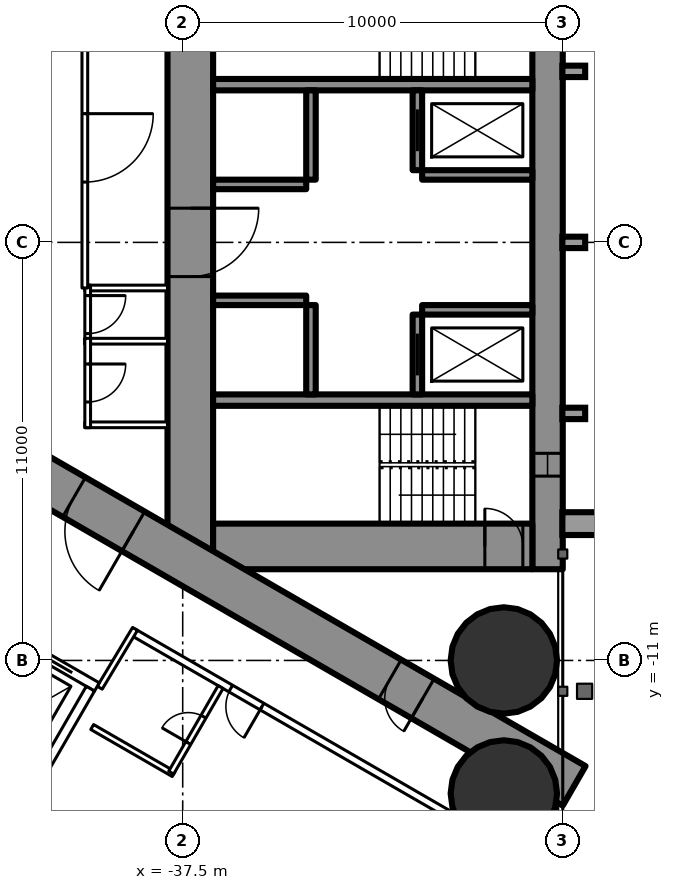
"""IFC4 building model, lengths in metres.
Left out: names, types, materials, properties, quantities, classifications, styles, units other than length and angle.
Written with IfcOpenShell. Run it as: python <this file> out.ifc"""

import sys

from ifc_helpers import new_model, si_unit, direction, frame, frame_2d, origin, origin_2d, place, context, subcontext, project, spatial, rectangle, circle, extrude, element, fill, save


model = new_model("IFC4")
c1 = context("Model", 3, precision=1e-05, world=origin(), true_north=direction((0.0, 1.0)))
c2 = subcontext(c1, "Body", "Model", "MODEL_VIEW")
j1 = project(units=[si_unit("LENGTHUNIT", "METRE"), si_unit("PLANEANGLEUNIT", "RADIAN")], contexts=[c1])
p1 = place(None, origin())
s1 = spatial("IfcSite", under=j1, at=p1, CompositionType="ELEMENT")
p2 = place(p1, origin())
s2 = spatial("IfcBuilding", under=s1, at=p2, CompositionType="ELEMENT")
p3 = place(p2, frame((0.0, 0.0, 170.3)))
s3 = spatial("IfcBuildingStorey", under=s2, at=p3, CompositionType="ELEMENT", Elevation=170.3)
for number, where, z_axis, x_axis in (
    (1, (-29.05, -11.0, 0.0), (0.0, 0.0, 1.0), (1.0, 0.0, 0.0)),
    (2, (-29.05, -14.5, 0.0), (0.0, 0.0, 1.0), (1.0, 0.0, 0.0)),
):
    element("IfcColumn", number, at=place(p3, frame(where, z_axis=z_axis, x_axis=x_axis)), inside=s3, PredefinedType="COLUMN", context=c2, shape_type="SweptSolid", body=[
        extrude(circle(Radius=1.4, at=origin_2d()), origin(), (0.0, 0.0, 1.0), 3.5),
    ])
p4 = place(p3, frame((-27.9, 8.6, 0.0), z_axis=(0.0, 0.0, 1.0), x_axis=(0.0, -1.0, 0.0)))
e3 = element("IfcWall", 3, at=p4, inside=s3, PredefinedType="SHEAR", context=c2, shape_type="SweptSolid", body=[
    extrude(rectangle(XDim=17.2, YDim=0.8, at=frame_2d((8.6, 0.0))), origin(), (0.0, 0.0, 1.0), 3.5),
])
p5 = place(p4, frame((2.45, 0.0, 0.6)))
e4 = element("IfcOpeningElement", 4, at=p5, cuts=e3, PredefinedType="OPENING", context=c2, shape_type="SweptSolid", body=[
    extrude(rectangle(XDim=0.6, YDim=2.1, at=frame_2d((0.3, 1.05))), frame((0.0, 0.41, 0.0), z_axis=(0.0, -1.0, 0.0), x_axis=(1.0, 0.0, 0.0)), (0.0, 0.0, 1.0), 0.82),
])
p6 = place(p4, frame((14.15, 0.0, 0.6)))
e5 = element("IfcOpeningElement", 5, at=p6, cuts=e3, PredefinedType="OPENING", context=c2, shape_type="SweptSolid", body=[
    extrude(rectangle(XDim=0.6, YDim=2.1, at=frame_2d((0.3, 1.05))), frame((0.0, 0.41, 0.0), z_axis=(0.0, -1.0, 0.0), x_axis=(1.0, 0.0, 0.0)), (0.0, 0.0, 1.0), 0.82),
])
p7 = place(p3, frame((-37.3, 8.6, 0.0), z_axis=(0.0, 0.0, 1.0), x_axis=(0.0, -1.0, 0.0)))
e6 = element("IfcWall", 6, at=p7, inside=s3, PredefinedType="SHEAR", context=c2, shape_type="SweptSolid", body=[
    extrude(rectangle(XDim=17.2, YDim=1.2, at=frame_2d((8.6, 0.0))), origin(), (0.0, 0.0, 1.0), 3.5),
])
p8 = place(p7, frame((7.7, 0.0, 0.0)))
e7 = element("IfcOpeningElement", 7, at=p8, cuts=e6, PredefinedType="OPENING", context=c2, shape_type="SweptSolid", body=[
    extrude(rectangle(XDim=1.8, YDim=2.2, at=frame_2d((0.9, 1.1))), frame((0.0, 0.61, 0.0), z_axis=(0.0, -1.0, 0.0), x_axis=(1.0, 0.0, 0.0)), (0.0, 0.0, 1.0), 1.22),
])
p9 = place(p3, frame((-28.3, -8.0, 0.0), z_axis=(0.0, 0.0, 1.0), x_axis=(-1.0, 0.0, 0.0)))
e8 = element("IfcWall", 8, at=p9, inside=s3, PredefinedType="SHEAR", context=c2, shape_type="SweptSolid", body=[
    extrude(rectangle(XDim=8.4, YDim=1.2, at=frame_2d((4.2, 0.0))), origin(), (0.0, 0.0, 1.0), 3.5),
])
p10 = place(p9, frame((0.25, 0.0, 0.0)))
e9 = element("IfcOpeningElement", 9, at=p10, cuts=e8, PredefinedType="OPENING", context=c2, shape_type="SweptSolid", body=[
    extrude(rectangle(XDim=1.0, YDim=2.2, at=frame_2d((0.5, 1.1))), frame((0.0, 0.61, 0.0), z_axis=(0.0, -1.0, 0.0), x_axis=(1.0, 0.0, 0.0)), (0.0, 0.0, 1.0), 1.22),
])
for number, where, z_axis, x_axis in (
    (10, (-28.3, 4.15, 0.0), (0.0, 0.0, 1.0), (-1.0, 0.0, 0.0)),
    (11, (-28.3, -4.15, 0.0), (0.0, 0.0, 1.0), (-1.0, 0.0, 0.0)),
):
    element("IfcWall", number, at=place(p3, frame(where, z_axis=z_axis, x_axis=x_axis)), inside=s3, PredefinedType="SHEAR", context=c2, shape_type="SweptSolid", body=[
        extrude(rectangle(XDim=8.4, YDim=0.3, at=frame_2d((4.2, 0.0))), origin(), (0.0, 0.0, 1.0), 3.5),
    ])
p11 = place(p3, frame((-31.325, 4.0, 0.0), z_axis=(0.0, 0.0, 1.0), x_axis=(0.0, -1.0, 0.0)))
e12 = element("IfcWall", 12, at=p11, inside=s3, PredefinedType="SHEAR", context=c2, shape_type="SweptSolid", body=[
    extrude(rectangle(XDim=2.1, YDim=0.25, at=frame_2d((1.05, 0.0))), origin(), (0.0, 0.0, 1.0), 3.5),
])
p12 = place(p11, frame((0.5, 0.0, 0.0)))
e13 = element("IfcOpeningElement", 13, at=p12, cuts=e12, PredefinedType="OPENING", context=c2, shape_type="SweptSolid", body=[
    extrude(rectangle(XDim=1.1, YDim=2.2, at=frame_2d((0.55, 1.1))), frame((0.0, 0.135, 0.0), z_axis=(0.0, -1.0, 0.0), x_axis=(1.0, 0.0, 0.0)), (0.0, 0.0, 1.0), 0.27),
])
p13 = place(p3, frame((-34.125, 4.0, 0.0), z_axis=(0.0, 0.0, 1.0), x_axis=(0.0, -1.0, 0.0)))
e14 = element("IfcWall", 14, at=p13, inside=s3, PredefinedType="SHEAR", context=c2, shape_type="SweptSolid", body=[
    extrude(rectangle(XDim=2.35, YDim=0.25, at=frame_2d((1.175, 0.0))), origin(), (0.0, 0.0, 1.0), 3.5),
])
p14 = place(p3, frame((-28.3, 1.775, 0.0), z_axis=(0.0, 0.0, 1.0), x_axis=(-1.0, 0.0, 0.0)))
e15 = element("IfcWall", 15, at=p14, inside=s3, PredefinedType="SHEAR", context=c2, shape_type="SweptSolid", body=[
    extrude(rectangle(XDim=2.9, YDim=0.25, at=frame_2d((1.45, 0.0))), origin(), (0.0, 0.0, 1.0), 3.5),
])
p15 = place(p3, frame((-34.25, 1.525, 0.0), z_axis=(0.0, 0.0, 1.0), x_axis=(-1.0, 0.0, 0.0)))
e16 = element("IfcWall", 16, at=p15, inside=s3, PredefinedType="SHEAR", context=c2, shape_type="SweptSolid", body=[
    extrude(rectangle(XDim=2.45, YDim=0.25, at=frame_2d((1.225, 0.0))), origin(), (0.0, 0.0, 1.0), 3.5),
])
p16 = place(p3, frame((-31.325, -1.9, 0.0), z_axis=(0.0, 0.0, 1.0), x_axis=(0.0, -1.0, 0.0)))
e17 = element("IfcWall", 17, at=p16, inside=s3, PredefinedType="SHEAR", context=c2, shape_type="SweptSolid", body=[
    extrude(rectangle(XDim=2.1, YDim=0.25, at=frame_2d((1.05, 0.0))), origin(), (0.0, 0.0, 1.0), 3.5),
])
p17 = place(p16, frame((0.5, 0.0, 0.0)))
e18 = element("IfcOpeningElement", 18, at=p17, cuts=e17, PredefinedType="OPENING", context=c2, shape_type="SweptSolid", body=[
    extrude(rectangle(XDim=1.1, YDim=2.2, at=frame_2d((0.55, 1.1))), frame((0.0, 0.135, 0.0), z_axis=(0.0, -1.0, 0.0), x_axis=(1.0, 0.0, 0.0)), (0.0, 0.0, 1.0), 0.27),
])
p18 = place(p3, frame((-34.125, -1.65, 0.0), z_axis=(0.0, 0.0, 1.0), x_axis=(0.0, -1.0, 0.0)))
e19 = element("IfcWall", 19, at=p18, inside=s3, PredefinedType="SHEAR", context=c2, shape_type="SweptSolid", body=[
    extrude(rectangle(XDim=2.35, YDim=0.25, at=frame_2d((1.175, 0.0))), origin(), (0.0, 0.0, 1.0), 3.5),
])
p19 = place(p3, frame((-28.3, -1.775, 0.0), z_axis=(0.0, 0.0, 1.0), x_axis=(-1.0, 0.0, 0.0)))
e20 = element("IfcWall", 20, at=p19, inside=s3, PredefinedType="SHEAR", context=c2, shape_type="SweptSolid", body=[
    extrude(rectangle(XDim=2.9, YDim=0.25, at=frame_2d((1.45, 0.0))), origin(), (0.0, 0.0, 1.0), 3.5),
])
p20 = place(p3, frame((-34.25, -1.525, 0.0), z_axis=(0.0, 0.0, 1.0), x_axis=(-1.0, 0.0, 0.0)))
e21 = element("IfcWall", 21, at=p20, inside=s3, PredefinedType="SHEAR", context=c2, shape_type="SweptSolid", body=[
    extrude(rectangle(XDim=2.45, YDim=0.25, at=frame_2d((1.225, 0.0))), origin(), (0.0, 0.0, 1.0), 3.5),
])
p21 = place(p3, frame((-27.2, 14.3, 0.0), z_axis=(0.0, 0.0, 1.0), x_axis=(-0.866026593062, -0.499997940104, 0.0)))
e22 = element("IfcWall", 22, at=p21, inside=s3, PredefinedType="SHEAR", context=c2, shape_type="SweptSolid", body=[
    extrude(rectangle(XDim=28.946, YDim=1.2, at=frame_2d((14.473, 0.0))), origin(), (0.0, 0.0, 1.0), 3.5),
])
p22 = place(p21, frame((4.6, 0.0, 0.0)))
e23 = element("IfcOpeningElement", 23, at=p22, cuts=e22, PredefinedType="OPENING", context=c2, shape_type="SweptSolid", body=[
    extrude(rectangle(XDim=1.0, YDim=2.2, at=frame_2d((0.5, 1.1))), frame((0.0, 0.61, 0.0), z_axis=(0.0, -1.0, 0.0), x_axis=(1.0, 0.0, 0.0)), (0.0, 0.0, 1.0), 1.22),
])
p23 = place(p21, frame((13.395, 0.0, 0.0)))
e24 = element("IfcOpeningElement", 24, at=p23, cuts=e22, PredefinedType="OPENING", context=c2, shape_type="SweptSolid", body=[
    extrude(rectangle(XDim=1.8, YDim=2.2, at=frame_2d((0.9, 1.1))), frame((0.0, 0.61, 0.0), z_axis=(0.0, -1.0, 0.0), x_axis=(1.0, 0.0, 0.0)), (0.0, 0.0, 1.0), 1.22),
])
p24 = place(p3, frame((-27.2, -14.3, 0.0), z_axis=(0.0, 0.0, 1.0), x_axis=(-0.866024021859, 0.500002393557, 0.0)))
e25 = element("IfcWall", 25, at=p24, inside=s3, PredefinedType="SHEAR", context=c2, shape_type="SweptSolid", body=[
    extrude(rectangle(XDim=27.907, YDim=1.2, at=frame_2d((13.954, 0.0))), origin(), (0.0, 0.0, 1.0), 3.5),
])
p25 = place(p24, frame((4.6, 0.0, 0.0)))
e26 = element("IfcOpeningElement", 26, at=p25, cuts=e25, PredefinedType="OPENING", context=c2, shape_type="SweptSolid", body=[
    extrude(rectangle(XDim=1.0, YDim=2.2, at=frame_2d((0.5, 1.1))), frame((0.0, 0.61, 0.0), z_axis=(0.0, -1.0, 0.0), x_axis=(1.0, 0.0, 0.0)), (0.0, 0.0, 1.0), 1.22),
])
p26 = place(p24, frame((13.395, 0.0, 0.0)))
e27 = element("IfcOpeningElement", 27, at=p26, cuts=e25, PredefinedType="OPENING", context=c2, shape_type="SweptSolid", body=[
    extrude(rectangle(XDim=1.8, YDim=2.2, at=frame_2d((0.9, 1.1))), frame((0.0, 0.61, 0.0), z_axis=(0.0, -1.0, 0.0), x_axis=(1.0, 0.0, 0.0)), (0.0, 0.0, 1.0), 1.22),
])
p27 = place(p3, frame((-27.86, 16.575, 0.0), z_axis=(0.0, 0.0, 1.0), x_axis=(-0.866025533911, -0.499999774615, 0.0)))
e28 = element("IfcWall", 28, at=p27, inside=s3, PredefinedType="PARTITIONING", context=c2, shape_type="SweptSolid", body=[
    extrude(rectangle(XDim=33.149, YDim=0.2, at=frame_2d((16.575, 0.0))), origin(), (0.0, 0.0, 1.0), 3.25),
])
p28 = place(p27, frame((3.75, 0.0, 0.0)))
e29 = element("IfcOpeningElement", 29, at=p28, cuts=e28, PredefinedType="OPENING", context=c2, shape_type="SweptSolid", body=[
    extrude(rectangle(XDim=1.0, YDim=2.2, at=frame_2d((0.5, 1.1))), frame((0.0, 0.11, 0.0), z_axis=(0.0, -1.0, 0.0), x_axis=(1.0, 0.0, 0.0)), (0.0, 0.0, 1.0), 0.22),
])
p29 = place(p27, frame((20.347, 0.0, 0.0)))
e30 = element("IfcOpeningElement", 30, at=p29, cuts=e28, PredefinedType="OPENING", context=c2, shape_type="SweptSolid", body=[
    extrude(rectangle(XDim=0.95, YDim=2.2, at=frame_2d((0.475, 1.1))), frame((0.0, 0.11, 0.0), z_axis=(0.0, -1.0, 0.0), x_axis=(1.0, 0.0, 0.0)), (0.0, 0.0, 1.0), 0.22),
])
p30 = place(p27, frame((24.397, 0.0, 0.0)))
e31 = element("IfcOpeningElement", 31, at=p30, cuts=e28, PredefinedType="OPENING", context=c2, shape_type="SweptSolid", body=[
    extrude(rectangle(XDim=0.95, YDim=2.2, at=frame_2d((0.475, 1.1))), frame((0.0, 0.11, 0.0), z_axis=(0.0, -1.0, 0.0), x_axis=(1.0, 0.0, 0.0)), (0.0, 0.0, 1.0), 0.22),
])
p31 = place(p27, frame((30.042, 0.0, 0.0)))
e32 = element("IfcOpeningElement", 32, at=p31, cuts=e28, PredefinedType="OPENING", context=c2, shape_type="SweptSolid", body=[
    extrude(rectangle(XDim=0.95, YDim=2.2, at=frame_2d((0.475, 1.1))), frame((0.0, 0.11, 0.0), z_axis=(0.0, -1.0, 0.0), x_axis=(1.0, 0.0, 0.0)), (0.0, 0.0, 1.0), 0.22),
])
p32 = place(p3, frame((-27.86, -16.575, 0.0), z_axis=(0.0, 0.0, 1.0), x_axis=(-0.866027756871, 0.499995924312, 0.0)))
e33 = element("IfcWall", 33, at=p32, inside=s3, PredefinedType="PARTITIONING", context=c2, shape_type="SweptSolid", body=[
    extrude(rectangle(XDim=12.622, YDim=0.2, at=frame_2d((6.311, 0.0))), origin(), (0.0, 0.0, 1.0), 3.25),
])
p33 = place(p32, frame((8.722, 0.0, 0.0)))
e34 = element("IfcOpeningElement", 34, at=p33, cuts=e33, PredefinedType="OPENING", context=c2, shape_type="SweptSolid", body=[
    extrude(rectangle(XDim=0.95, YDim=2.2, at=frame_2d((0.475, 1.1))), frame((0.0, 0.11, 0.0), z_axis=(0.0, -1.0, 0.0), x_axis=(1.0, 0.0, 0.0)), (0.0, 0.0, 1.0), 0.22),
])
p34 = place(p3, frame((-39.683, -11.718, 0.0), z_axis=(0.0, 0.0, 1.0), x_axis=(0.514336634837, 0.857588377991, 0.0)))
e35 = element("IfcWall", 35, at=p34, inside=s3, PredefinedType="PARTITIONING", context=c2, shape_type="SweptSolid", body=[
    extrude(rectangle(XDim=1.805, YDim=0.15, at=frame_2d((0.903, 0.0))), origin(), (0.0, 0.0, 1.0), 3.25),
])
p35 = place(p3, frame((-37.738, -13.989, 0.0), z_axis=(0.0, 0.0, 1.0), x_axis=(-0.86604923931, 0.499958713387, 0.0)))
e36 = element("IfcWall", 36, at=p35, inside=s3, PredefinedType="PARTITIONING", context=c2, shape_type="SweptSolid", body=[
    extrude(rectangle(XDim=2.475, YDim=0.15, at=frame_2d((1.237, 0.0))), origin(), (0.0, 0.0, 1.0), 3.25),
])
p36 = place(p3, frame((-36.503, -11.7, 0.0), z_axis=(0.0, 0.0, 1.0), x_axis=(-0.500006934395, -0.866021400173, 0.0)))
e37 = element("IfcWall", 37, at=p36, inside=s3, PredefinedType="PARTITIONING", context=c2, shape_type="SweptSolid", body=[
    extrude(rectangle(XDim=2.6, YDim=0.15, at=frame_2d((1.3, 0.0))), origin(), (0.0, 0.0, 1.0), 3.25),
])
p37 = place(p36, frame((0.9, 0.0, 0.0)))
e38 = element("IfcOpeningElement", 38, at=p37, cuts=e37, PredefinedType="OPENING", context=c2, shape_type="SweptSolid", body=[
    extrude(rectangle(XDim=0.8, YDim=2.2, at=frame_2d((0.4, 1.1))), frame((0.0, 0.085, 0.0), z_axis=(0.0, -1.0, 0.0), x_axis=(1.0, 0.0, 0.0)), (0.0, 0.0, 1.0), 0.17),
])
for number, where, z_axis, x_axis in (
    (39, (-37.9, -1.2, 0.0), (0.0, 0.0, 1.0), (-1.0, 0.0, 0.0)),
    (40, (-37.9, -2.6, 0.0), (0.0, 0.0, 1.0), (-1.0, 0.0, 0.0)),
    (41, (-37.9, -4.8, 0.0), (0.0, 0.0, 1.0), (-1.0, 0.0, 0.0)),
):
    element("IfcWall", number, at=place(p3, frame(where, z_axis=z_axis, x_axis=x_axis)), inside=s3, PredefinedType="PARTITIONING", context=c2, shape_type="SweptSolid", body=[
        extrude(rectangle(XDim=2.175, YDim=0.15, at=frame_2d((1.087, 0.0))), origin(), (0.0, 0.0, 1.0), 3.25),
    ])
p38 = place(p3, frame((-40.0, -1.125, 0.0), z_axis=(0.0, 0.0, 1.0), x_axis=(0.0, -1.0, 0.0)))
e42 = element("IfcWall", 42, at=p38, inside=s3, PredefinedType="PARTITIONING", context=c2, shape_type="SweptSolid", body=[
    extrude(rectangle(XDim=1.55, YDim=0.15, at=frame_2d((0.775, 0.0))), origin(), (0.0, 0.0, 1.0), 3.25),
])
p39 = place(p38, frame((0.275, 0.0, 0.0)))
e43 = element("IfcOpeningElement", 43, at=p39, cuts=e42, PredefinedType="OPENING", context=c2, shape_type="SweptSolid", body=[
    extrude(rectangle(XDim=1.0, YDim=2.2, at=frame_2d((0.5, 1.1))), frame((0.0, 0.085, 0.0), z_axis=(0.0, -1.0, 0.0), x_axis=(1.0, 0.0, 0.0)), (0.0, 0.0, 1.0), 0.17),
])
p40 = place(p3, frame((-40.0, -2.525, 0.0), z_axis=(0.0, 0.0, 1.0), x_axis=(0.0, -1.0, 0.0)))
e44 = element("IfcWall", 44, at=p40, inside=s3, PredefinedType="PARTITIONING", context=c2, shape_type="SweptSolid", body=[
    extrude(rectangle(XDim=2.35, YDim=0.15, at=frame_2d((1.175, 0.0))), origin(), (0.0, 0.0, 1.0), 3.25),
])
p41 = place(p40, frame((0.675, 0.0, 0.0)))
e45 = element("IfcOpeningElement", 45, at=p41, cuts=e44, PredefinedType="OPENING", context=c2, shape_type="SweptSolid", body=[
    extrude(rectangle(XDim=1.0, YDim=2.2, at=frame_2d((0.5, 1.1))), frame((0.0, 0.085, 0.0), z_axis=(0.0, -1.0, 0.0), x_axis=(1.0, 0.0, 0.0)), (0.0, 0.0, 1.0), 0.17),
])
p42 = place(p3, frame((-40.075, 6.174, 0.0), z_axis=(0.0, 0.0, 1.0), x_axis=(0.0, -1.0, 0.0)))
e46 = element("IfcWall", 46, at=p42, inside=s3, PredefinedType="PARTITIONING", context=c2, shape_type="SweptSolid", body=[
    extrude(rectangle(XDim=7.374, YDim=0.15, at=frame_2d((3.687, 0.0))), origin(), (0.0, 0.0, 1.0), 3.25),
])
p43 = place(p42, frame((2.787, 0.0, 0.0)))
e47 = element("IfcOpeningElement", 47, at=p43, cuts=e46, PredefinedType="OPENING", context=c2, shape_type="SweptSolid", body=[
    extrude(rectangle(XDim=1.8, YDim=2.2, at=frame_2d((0.9, 1.1))), frame((0.0, 0.085, 0.0), z_axis=(0.0, -1.0, 0.0), x_axis=(1.0, 0.0, 0.0)), (0.0, 0.0, 1.0), 0.17),
])
p44 = place(p3, frame((-39.758, -11.697, 0.0), z_axis=(0.0, 0.0, 1.0), x_axis=(-0.866024194504, 0.500002094529, 0.0)))
e48 = element("IfcWall", 48, at=p44, inside=s3, PredefinedType="PARTITIONING", context=c2, shape_type="SweptSolid", body=[
    extrude(rectangle(XDim=6.6, YDim=0.25, at=frame_2d((3.3, 0.0))), origin(), (0.0, 0.0, 1.0), 3.25),
])
p45 = place(p44, frame((0.75, 0.0, 0.0)))
e49 = element("IfcOpeningElement", 49, at=p45, cuts=e48, PredefinedType="OPENING", context=c2, shape_type="SweptSolid", body=[
    extrude(rectangle(XDim=1.1, YDim=2.2, at=frame_2d((0.55, 1.1))), frame((0.0, 0.135, 0.0), z_axis=(0.0, -1.0, 0.0), x_axis=(1.0, 0.0, 0.0)), (0.0, 0.0, 1.0), 0.27),
])
p46 = place(p44, frame((2.75, 0.0, 0.0)))
e50 = element("IfcOpeningElement", 50, at=p46, cuts=e48, PredefinedType="OPENING", context=c2, shape_type="SweptSolid", body=[
    extrude(rectangle(XDim=1.1, YDim=2.2, at=frame_2d((0.55, 1.1))), frame((0.0, 0.135, 0.0), z_axis=(0.0, -1.0, 0.0), x_axis=(1.0, 0.0, 0.0)), (0.0, 0.0, 1.0), 0.27),
])
p47 = place(p44, frame((4.75, 0.0, 0.0)))
e51 = element("IfcOpeningElement", 51, at=p47, cuts=e48, PredefinedType="OPENING", context=c2, shape_type="SweptSolid", body=[
    extrude(rectangle(XDim=1.1, YDim=2.2, at=frame_2d((0.55, 1.1))), frame((0.0, 0.135, 0.0), z_axis=(0.0, -1.0, 0.0), x_axis=(1.0, 0.0, 0.0)), (0.0, 0.0, 1.0), 0.27),
])
p48 = place(p3, frame((-39.928, -11.743, 0.0), z_axis=(0.0, 0.0, 1.0), x_axis=(-0.499929347863, -0.866066190972, 0.0)))
e52 = element("IfcWall", 52, at=p48, inside=s3, PredefinedType="PARTITIONING", context=c2, shape_type="SweptSolid", body=[
    extrude(rectangle(XDim=3.201, YDim=0.25, at=frame_2d((1.6, 0.0))), origin(), (0.0, 0.0, 1.0), 3.25),
])
p49 = place(p37, origin())
e53 = element("IfcDoor", 53, at=p49, inside=s3, OperationType="SINGLE_SWING_RIGHT", PredefinedType="DOOR", context=c2, shape_type="SweptSolid", body=[
    extrude(rectangle(XDim=0.8, YDim=2.2, at=frame_2d((0.4, 1.1))), frame((0.0, 0.025, 0.0), z_axis=(0.0, -1.0, 0.0), x_axis=(1.0, 0.0, 0.0)), (0.0, 0.0, 1.0), 0.05),
])
fill(e38, e53)
p50 = place(p33, origin())
e54 = element("IfcDoor", 54, at=p50, inside=s3, OperationType="SINGLE_SWING_LEFT", PredefinedType="DOOR", context=c2, shape_type="SweptSolid", body=[
    extrude(rectangle(XDim=0.95, YDim=2.2, at=frame_2d((0.475, 1.1))), frame((0.0, 0.025, 0.0), z_axis=(0.0, -1.0, 0.0), x_axis=(1.0, 0.0, 0.0)), (0.0, 0.0, 1.0), 0.05),
])
fill(e34, e54)
p51 = place(p39, origin())
e55 = element("IfcDoor", 55, at=p51, inside=s3, OperationType="SINGLE_SWING_LEFT", PredefinedType="DOOR", context=c2, shape_type="SweptSolid", body=[
    extrude(rectangle(XDim=1.0, YDim=2.2, at=frame_2d((0.5, 1.1))), frame((0.0, 0.025, 0.0), z_axis=(0.0, -1.0, 0.0), x_axis=(1.0, 0.0, 0.0)), (0.0, 0.0, 1.0), 0.05),
])
fill(e43, e55)
p52 = place(p41, origin())
e56 = element("IfcDoor", 56, at=p52, inside=s3, OperationType="SINGLE_SWING_LEFT", PredefinedType="DOOR", context=c2, shape_type="SweptSolid", body=[
    extrude(rectangle(XDim=1.0, YDim=2.2, at=frame_2d((0.5, 1.1))), frame((0.0, 0.025, 0.0), z_axis=(0.0, -1.0, 0.0), x_axis=(1.0, 0.0, 0.0)), (0.0, 0.0, 1.0), 0.05),
])
fill(e45, e56)
p53 = place(p43, origin())
e57 = element("IfcDoor", 57, at=p53, inside=s3, OperationType="DOUBLE_DOOR_SINGLE_SWING", PredefinedType="DOOR", context=c2, shape_type="SweptSolid", body=[
    extrude(rectangle(XDim=1.8, YDim=2.2, at=frame_2d((0.9, 1.1))), frame((0.0, 0.025, 0.0), z_axis=(0.0, -1.0, 0.0), x_axis=(1.0, 0.0, 0.0)), (0.0, 0.0, 1.0), 0.05),
])
fill(e47, e57)
p54 = place(p25, origin())
e58 = element("IfcDoor", 58, at=p54, inside=s3, OperationType="SINGLE_SWING_LEFT", PredefinedType="DOOR", context=c2, shape_type="SweptSolid", body=[
    extrude(rectangle(XDim=1.0, YDim=2.2, at=frame_2d((0.5, 1.1))), frame((0.0, 0.025, 0.0), z_axis=(0.0, -1.0, 0.0), x_axis=(1.0, 0.0, 0.0)), (0.0, 0.0, 1.0), 0.05),
])
fill(e26, e58)
p55 = place(p26, origin())
e59 = element("IfcDoor", 59, at=p55, inside=s3, OperationType="DOUBLE_DOOR_SINGLE_SWING", PredefinedType="DOOR", context=c2, shape_type="SweptSolid", body=[
    extrude(rectangle(XDim=1.8, YDim=2.2, at=frame_2d((0.9, 1.1))), frame((0.0, 0.025, 0.0), z_axis=(0.0, -1.0, 0.0), x_axis=(1.0, 0.0, 0.0)), (0.0, 0.0, 1.0), 0.05),
])
fill(e27, e59)
p56 = place(p8, origin())
e60 = element("IfcDoor", 60, at=p56, inside=s3, OperationType="DOUBLE_DOOR_SINGLE_SWING", PredefinedType="DOOR", context=c2, shape_type="SweptSolid", body=[
    extrude(rectangle(XDim=1.8, YDim=2.2, at=frame_2d((0.9, 1.1))), frame((0.0, 0.025, 0.0), z_axis=(0.0, -1.0, 0.0), x_axis=(1.0, 0.0, 0.0)), (0.0, 0.0, 1.0), 0.05),
])
fill(e7, e60)
p57 = place(p10, origin())
e61 = element("IfcDoor", 61, at=p57, inside=s3, OperationType="SINGLE_SWING_RIGHT", PredefinedType="DOOR", context=c2, shape_type="SweptSolid", body=[
    extrude(rectangle(XDim=1.0, YDim=2.2, at=frame_2d((0.5, 1.1))), frame((0.0, 0.025, 0.0), z_axis=(0.0, -1.0, 0.0), x_axis=(1.0, 0.0, 0.0)), (0.0, 0.0, 1.0), 0.05),
])
fill(e9, e61)
p58 = place(p12, origin())
e62 = element("IfcDoor", 62, at=p58, inside=s3, OperationType="SLIDING_TO_LEFT", PredefinedType="USERDEFINED", context=c2, shape_type="SweptSolid", body=[
    extrude(rectangle(XDim=1.1, YDim=2.2, at=frame_2d((0.55, 1.1))), frame((0.0, 0.025, 0.0), z_axis=(0.0, -1.0, 0.0), x_axis=(1.0, 0.0, 0.0)), (0.0, 0.0, 1.0), 0.05),
])
fill(e13, e62)
p59 = place(p17, origin())
e63 = element("IfcDoor", 63, at=p59, inside=s3, OperationType="SLIDING_TO_LEFT", PredefinedType="USERDEFINED", context=c2, shape_type="SweptSolid", body=[
    extrude(rectangle(XDim=1.1, YDim=2.2, at=frame_2d((0.55, 1.1))), frame((0.0, 0.025, 0.0), z_axis=(0.0, -1.0, 0.0), x_axis=(1.0, 0.0, 0.0)), (0.0, 0.0, 1.0), 0.05),
])
fill(e18, e63)
p60 = place(p45, origin())
e64 = element("IfcDoor", 64, at=p60, inside=s3, OperationType="DOUBLE_DOOR_SLIDING", PredefinedType="USERDEFINED", context=c2, shape_type="SweptSolid", body=[
    extrude(rectangle(XDim=1.1, YDim=2.2, at=frame_2d((0.55, 1.1))), frame((0.0, 0.025, 0.0), z_axis=(0.0, -1.0, 0.0), x_axis=(1.0, 0.0, 0.0)), (0.0, 0.0, 1.0), 0.05),
])
fill(e49, e64)
p61 = place(p6, origin())
e65 = element("IfcWindow", 65, at=p61, inside=s3, PartitioningType="SINGLE_PANEL", PredefinedType="WINDOW", context=c2, shape_type="SweptSolid", body=[
    extrude(rectangle(XDim=0.6, YDim=2.1, at=frame_2d((0.3, 1.05))), frame((0.0, 0.03, 0.0), z_axis=(0.0, -1.0, 0.0), x_axis=(1.0, 0.0, 0.0)), (0.0, 0.0, 1.0), 0.06),
])
fill(e5, e65)
save(model, sys.argv[1])
